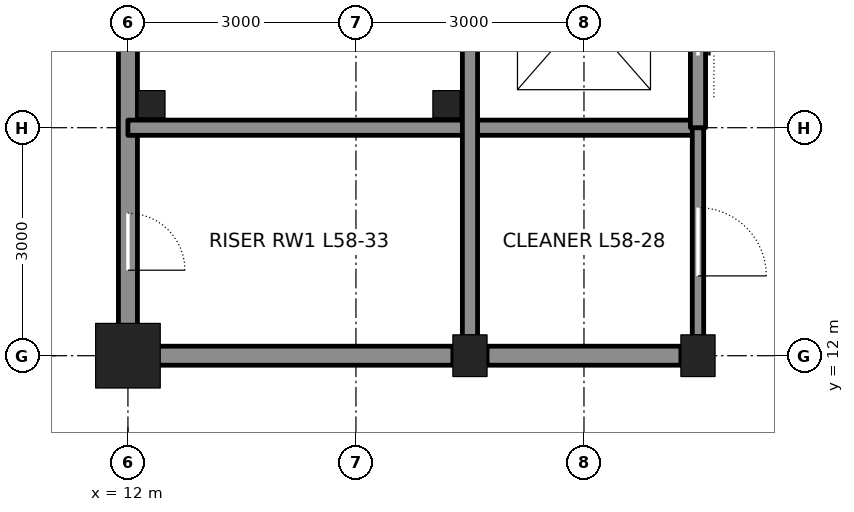
"""IFC4 building model, lengths in metres.
Left out: names, types, materials, properties, quantities, classifications, styles, units other than length and angle.
Written with IfcOpenShell. Run it as: python <this file> out.ifc"""

import sys

from ifc_helpers import new_model, si_unit, direction, frame, frame_2d, origin, origin_2d, place, context, subcontext, project, spatial, rectangle, hollow_rectangle, i_section, extrude, element, fill, save


model = new_model("IFC4")
c1 = context("Model", 3, precision=1e-05, world=origin(), true_north=direction((0.0, 1.0)))
c2 = subcontext(c1, "Body", "Model", "MODEL_VIEW")
j1 = project(units=[si_unit("LENGTHUNIT", "METRE"), si_unit("PLANEANGLEUNIT", "RADIAN")], contexts=[c1])
p1 = place(None, origin())
s1 = spatial("IfcSite", under=j1, at=p1, CompositionType="ELEMENT")
p2 = place(p1, origin())
s2 = spatial("IfcBuilding", under=s1, at=p2, CompositionType="ELEMENT")
p3 = place(p2, frame((0.0, 0.0, 262.2)))
s3 = spatial("IfcBuildingStorey", under=s2, at=p3, CompositionType="ELEMENT", Elevation=262.2)
p4 = place(p3, frame((12.0, 12.0, 0.0), z_axis=(0.0, 0.0, 1.0), x_axis=(1.0, 0.0, 0.0)))
e1 = element("IfcColumn", 1, at=p4, inside=s3, PredefinedType="COLUMN", context=c2, shape_type="SweptSolid", body=[
    extrude(hollow_rectangle(XDim=0.85, YDim=0.85, WallThickness=0.085, at=origin_2d()), origin(), (0.0, 0.0, 1.0), 4.2),
])
for number, where, z_axis, x_axis in (
    (2, (16.5, 12.0, 0.0), (0.0, 0.0, 1.0), (1.0, 0.0, 0.0)),
    (3, (19.5, 12.0, 0.0), (0.0, 0.0, 1.0), (1.0, 0.0, 0.0)),
):
    element("IfcColumn", number, at=place(p3, frame(where, z_axis=z_axis, x_axis=x_axis)), inside=s3, PredefinedType="COLUMN", context=c2, shape_type="SweptSolid", body=[
        extrude(i_section(OverallWidth=0.449, OverallDepth=0.549, WebThickness=0.072, FlangeThickness=0.115, at=origin_2d()), origin(), (0.0, 0.0, 1.0), 4.2),
    ])
p5 = place(p3, frame((12.0, 12.25, 0.0), z_axis=(0.0, 0.0, 1.0), x_axis=(0.0, 1.0, 0.0)))
e4 = element("IfcWall", 4, at=p5, inside=s3, PredefinedType="SOLIDWALL", context=c2, shape_type="SweptSolid", body=[
    extrude(rectangle(XDim=8.5, YDim=0.25, at=frame_2d((4.25, 0.0))), origin(), (0.0, 0.0, 1.0), 3.113),
])
p6 = place(p5, frame((0.875, 0.0, 0.0)))
e5 = element("IfcOpeningElement", 5, at=p6, cuts=e4, PredefinedType="OPENING", context=c2, shape_type="SweptSolid", body=[
    extrude(rectangle(XDim=0.75, YDim=2.1, at=frame_2d((0.375, 1.05))), frame((0.0, 0.135, 0.0), z_axis=(0.0, -1.0, 0.0), x_axis=(1.0, 0.0, 0.0)), (0.0, 0.0, 1.0), 0.27),
])
p7 = place(p3, frame((12.25, 12.0, 0.0), z_axis=(0.0, 0.0, 1.0), x_axis=(1.0, 0.0, 0.0)))
e6 = element("IfcWall", 6, at=p7, inside=s3, PredefinedType="SOLIDWALL", context=c2, shape_type="SweptSolid", body=[
    extrude(rectangle(XDim=4.025, YDim=0.25, at=frame_2d((2.013, 0.0))), origin(), (0.0, 0.0, 1.0), 3.182),
])
p8 = place(p3, frame((16.725, 12.0, 0.0), z_axis=(0.0, 0.0, 1.0), x_axis=(1.0, 0.0, 0.0)))
e7 = element("IfcWall", 7, at=p8, inside=s3, PredefinedType="SOLIDWALL", context=c2, shape_type="SweptSolid", body=[
    extrude(rectangle(XDim=2.55, YDim=0.25, at=frame_2d((1.275, 0.0))), origin(), (0.0, 0.0, 1.0), 3.182),
])
p9 = place(p3, frame((12.0, 15.0, 0.0), z_axis=(0.0, 0.0, 1.0), x_axis=(1.0, 0.0, 0.0)))
e8 = element("IfcWall", 8, at=p9, inside=s3, PredefinedType="SOLIDWALL", context=c2, shape_type="SweptSolid", body=[
    extrude(rectangle(XDim=7.5, YDim=0.2, at=frame_2d((3.75, 0.0))), origin(), (0.0, 0.0, 1.0), 4.04),
])
p10 = place(p3, frame((16.5, 12.25, 0.0), z_axis=(0.0, 0.0, 1.0), x_axis=(0.0, 1.0, 0.0)))
e9 = element("IfcWall", 9, at=p10, inside=s3, PredefinedType="SOLIDWALL", context=c2, shape_type="SweptSolid", body=[
    extrude(rectangle(XDim=8.5, YDim=0.2, at=frame_2d((4.25, 0.0))), origin(), (0.0, 0.0, 1.0), 3.113),
])
p11 = place(p3, frame((19.5, 12.25, 0.0), z_axis=(0.0, 0.0, 1.0), x_axis=(0.0, 1.0, 0.0)))
e10 = element("IfcWall", 10, at=p11, inside=s3, PredefinedType="PARTITIONING", context=c2, shape_type="SweptSolid", body=[
    extrude(rectangle(XDim=2.75, YDim=0.15, at=frame_2d((1.375, 0.0))), origin(), (0.0, 0.0, 1.0), 3.065),
])
p12 = place(p11, frame((0.8, 0.0, 0.0)))
e11 = element("IfcOpeningElement", 11, at=p12, cuts=e10, PredefinedType="OPENING", context=c2, shape_type="SweptSolid", body=[
    extrude(rectangle(XDim=0.9, YDim=2.1, at=frame_2d((0.45, 1.05))), frame((0.0, 0.085, 0.0), z_axis=(0.0, -1.0, 0.0), x_axis=(1.0, 0.0, 0.0)), (0.0, 0.0, 1.0), 0.17),
])
p13 = place(p3, frame((19.5, 15.0, 0.0), z_axis=(0.0, 0.0, 1.0), x_axis=(0.0, 1.0, 0.0)))
e12 = element("IfcWall", 12, at=p13, inside=s3, PredefinedType="SOLIDWALL", context=c2, shape_type="SweptSolid", body=[
    extrude(rectangle(XDim=12.0, YDim=0.2, at=frame_2d((6.0, 0.0))), origin(), (0.0, 0.0, 1.0), 3.065),
])
p14 = place(p13, frame((0.95, 0.0, 0.0)))
e13 = element("IfcOpeningElement", 13, at=p14, cuts=e12, PredefinedType="OPENING", context=c2, shape_type="SweptSolid", body=[
    extrude(rectangle(XDim=1.1, YDim=2.1, at=frame_2d((0.55, 1.05))), frame((0.0, 0.11, 0.0), z_axis=(0.0, -1.0, 0.0), x_axis=(1.0, 0.0, 0.0)), (0.0, 0.0, 1.0), 0.22),
])
p15 = place(p13, frame((3.95, 0.0, 0.0)))
e14 = element("IfcOpeningElement", 14, at=p15, cuts=e12, PredefinedType="OPENING", context=c2, shape_type="SweptSolid", body=[
    extrude(rectangle(XDim=1.1, YDim=2.1, at=frame_2d((0.55, 1.05))), frame((0.0, 0.11, 0.0), z_axis=(0.0, -1.0, 0.0), x_axis=(1.0, 0.0, 0.0)), (0.0, 0.0, 1.0), 0.22),
])
p16 = place(p13, frame((6.95, 0.0, 0.0)))
e15 = element("IfcOpeningElement", 15, at=p16, cuts=e12, PredefinedType="OPENING", context=c2, shape_type="SweptSolid", body=[
    extrude(rectangle(XDim=1.1, YDim=2.1, at=frame_2d((0.55, 1.05))), frame((0.0, 0.11, 0.0), z_axis=(0.0, -1.0, 0.0), x_axis=(1.0, 0.0, 0.0)), (0.0, 0.0, 1.0), 0.22),
])
p17 = place(p13, frame((9.95, 0.0, 0.0)))
e16 = element("IfcOpeningElement", 16, at=p17, cuts=e12, PredefinedType="OPENING", context=c2, shape_type="SweptSolid", body=[
    extrude(rectangle(XDim=1.1, YDim=2.1, at=frame_2d((0.55, 1.05))), frame((0.0, 0.11, 0.0), z_axis=(0.0, -1.0, 0.0), x_axis=(1.0, 0.0, 0.0)), (0.0, 0.0, 1.0), 0.22),
])
for number, where, z_axis, x_axis in (
    (17, (12.31, 15.31, 0.0), (0.0, 0.0, 1.0), (1.0, 0.0, 0.0)),
    (18, (16.19, 15.31, 0.0), (0.0, 0.0, 1.0), (1.0, 0.0, 0.0)),
):
    element("IfcColumn", number, at=place(p3, frame(where, z_axis=z_axis, x_axis=x_axis)), inside=s3, PredefinedType="COLUMN", context=c2, shape_type="SweptSolid", body=[
        extrude(hollow_rectangle(XDim=0.356, YDim=0.356, WallThickness=0.009, at=origin_2d()), origin(), (0.0, 0.0, 1.0), 4.2),
    ])
p18 = place(p6, frame((0.75, 0.0, 0.0), z_axis=(0.0, 0.0, 1.0), x_axis=(-1.0, 0.0, 0.0)))
e19 = element("IfcDoor", 19, at=p18, inside=s3, OperationType="SINGLE_SWING_RIGHT", PredefinedType="DOOR", context=c2, shape_type="SweptSolid", body=[
    extrude(rectangle(XDim=0.75, YDim=2.1, at=frame_2d((0.375, 1.05))), frame((0.0, 0.025, 0.0), z_axis=(0.0, -1.0, 0.0), x_axis=(1.0, 0.0, 0.0)), (0.0, 0.0, 1.0), 0.05),
])
fill(e5, e19)
p19 = place(p12, frame((0.9, 0.0, 0.0), z_axis=(0.0, 0.0, 1.0), x_axis=(-1.0, 0.0, 0.0)))
e20 = element("IfcDoor", 20, at=p19, inside=s3, OperationType="SINGLE_SWING_RIGHT", PredefinedType="DOOR", context=c2, shape_type="SweptSolid", body=[
    extrude(rectangle(XDim=0.9, YDim=2.1, at=frame_2d((0.45, 1.05))), frame((0.0, 0.025, 0.0), z_axis=(0.0, -1.0, 0.0), x_axis=(1.0, 0.0, 0.0)), (0.0, 0.0, 1.0), 0.05),
])
fill(e11, e20)
p20 = place(p14, origin())
e21 = element("IfcDoor", 21, at=p20, inside=s3, OperationType="DOUBLE_DOOR_SLIDING", PredefinedType="DOOR", context=c2, shape_type="SweptSolid", body=[
    extrude(rectangle(XDim=1.1, YDim=2.1, at=frame_2d((0.55, 1.05))), frame((0.0, 0.025, 0.0), z_axis=(0.0, -1.0, 0.0), x_axis=(1.0, 0.0, 0.0)), (0.0, 0.0, 1.0), 0.05),
])
fill(e13, e21)
save(model, sys.argv[1])
